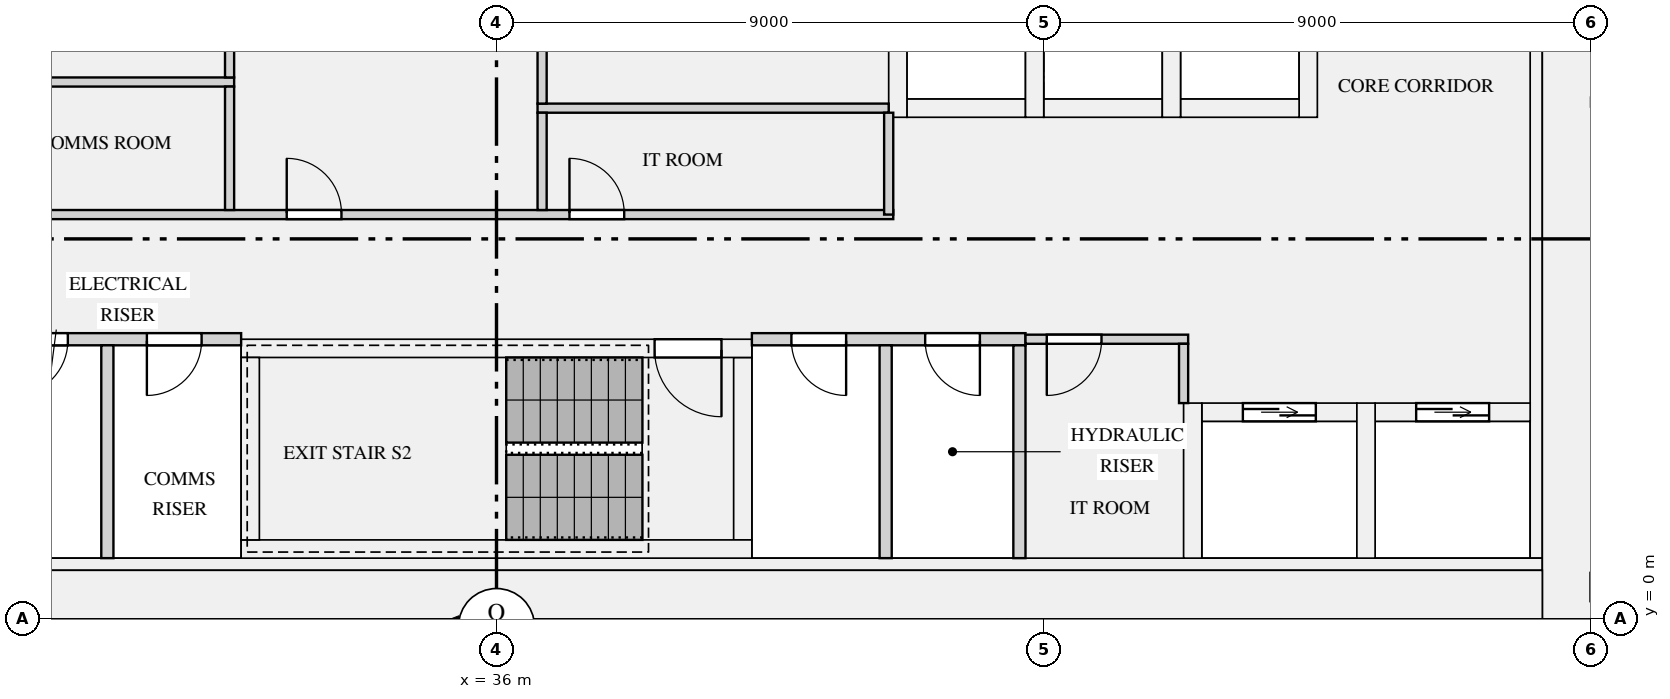
"""IFC4 building model, lengths in metres.
Left out: names, types, materials, properties, quantities, classifications, styles, units other than length and angle.
Written with IfcOpenShell. Run it as: python <this file> out.ifc"""

import sys

from ifc_helpers import new_model, si_unit, direction, frame, frame_2d, origin, place, context, subcontext, project, spatial, rectangle, extrude, element, fill, save


model = new_model("IFC4")
c1 = context("Model", 3, precision=1e-05, world=origin(), true_north=direction((0.0, 1.0)))
c2 = subcontext(c1, "Body", "Model", "MODEL_VIEW")
j1 = project(units=[si_unit("LENGTHUNIT", "METRE"), si_unit("PLANEANGLEUNIT", "RADIAN")], contexts=[c1])
p1 = place(None, origin())
s1 = spatial("IfcSite", under=j1, at=p1, CompositionType="ELEMENT")
p2 = place(p1, origin())
s2 = spatial("IfcBuilding", under=s1, at=p2, CompositionType="ELEMENT")
p3 = place(p2, frame((0.0, 0.0, 93.0)))
s3 = spatial("IfcBuildingStorey", under=s2, at=p3, CompositionType="ELEMENT", Elevation=93.0)
p4 = place(p3, frame((53.6, 0.0, 0.0), z_axis=(0.0, 0.0, 1.0), x_axis=(0.0, 1.0, 0.0)))
e1 = element("IfcWall", 1, at=p4, inside=s3, PredefinedType="SHEAR", context=c2, shape_type="SweptSolid", body=[
    extrude(rectangle(XDim=12.5, YDim=0.8, at=frame_2d((6.25, 0.0))), origin(), (0.0, 0.0, 1.0), 3.15),
])
p5 = place(p3, frame((18.8, 0.4, 0.0), z_axis=(0.0, 0.0, 1.0), x_axis=(1.0, 0.0, 0.0)))
e2 = element("IfcWall", 2, at=p5, inside=s3, PredefinedType="SHEAR", context=c2, shape_type="SweptSolid", body=[
    extrude(rectangle(XDim=34.4, YDim=0.8, at=frame_2d((17.2, 0.0))), origin(), (0.0, 0.0, 1.0), 3.15),
])
p6 = place(p3, frame((53.1, 1.0, 0.0), z_axis=(0.0, 0.0, 1.0), x_axis=(0.0, 1.0, 0.0)))
e3 = element("IfcWall", 3, at=p6, inside=s3, PredefinedType="SHEAR", context=c2, shape_type="SweptSolid", body=[
    extrude(rectangle(XDim=10.9, YDim=0.2, at=frame_2d((5.45, 0.0))), origin(), (0.0, 0.0, 1.0), 3.15),
])
p7 = place(p3, frame((18.8, 0.9, 0.0), z_axis=(0.0, 0.0, 1.0), x_axis=(1.0, 0.0, 0.0)))
e4 = element("IfcWall", 4, at=p7, inside=s3, PredefinedType="SHEAR", context=c2, shape_type="SweptSolid", body=[
    extrude(rectangle(XDim=34.4, YDim=0.2, at=frame_2d((17.2, 0.0))), origin(), (0.0, 0.0, 1.0), 3.15),
])
p8 = place(p3, frame((42.75, 8.4, 0.0), z_axis=(0.0, 0.0, 1.0), x_axis=(1.0, 0.0, 0.0)))
e5 = element("IfcWall", 5, at=p8, inside=s3, PredefinedType="SHEAR", context=c2, shape_type="SweptSolid", body=[
    extrude(rectangle(XDim=1.95, YDim=0.3, at=frame_2d((0.975, 0.0))), origin(), (0.0, 0.0, 1.0), 3.15),
])
p9 = place(p3, frame((42.6, 8.25, 0.0), z_axis=(0.0, 0.0, 1.0), x_axis=(0.0, 1.0, 0.0)))
e6 = element("IfcWall", 6, at=p9, inside=s3, PredefinedType="SHEAR", context=c2, shape_type="SweptSolid", body=[
    extrude(rectangle(XDim=3.65, YDim=0.3, at=frame_2d((1.825, 0.0))), origin(), (0.0, 0.0, 1.0), 3.15),
])
p10 = place(p3, frame((45.0, 8.4, 0.0), z_axis=(0.0, 0.0, 1.0), x_axis=(1.0, 0.0, 0.0)))
e7 = element("IfcWall", 7, at=p10, inside=s3, PredefinedType="SHEAR", context=c2, shape_type="SweptSolid", body=[
    extrude(rectangle(XDim=1.95, YDim=0.3, at=frame_2d((0.975, 0.0))), origin(), (0.0, 0.0, 1.0), 3.15),
])
p11 = place(p3, frame((44.85, 8.25, 0.0), z_axis=(0.0, 0.0, 1.0), x_axis=(0.0, 1.0, 0.0)))
e8 = element("IfcWall", 8, at=p11, inside=s3, PredefinedType="SHEAR", context=c2, shape_type="SweptSolid", body=[
    extrude(rectangle(XDim=3.65, YDim=0.3, at=frame_2d((1.825, 0.0))), origin(), (0.0, 0.0, 1.0), 3.15),
])
p12 = place(p3, frame((47.25, 8.4, 0.0), z_axis=(0.0, 0.0, 1.0), x_axis=(1.0, 0.0, 0.0)))
e9 = element("IfcWall", 9, at=p12, inside=s3, PredefinedType="SHEAR", context=c2, shape_type="SweptSolid", body=[
    extrude(rectangle(XDim=1.95, YDim=0.3, at=frame_2d((0.975, 0.0))), origin(), (0.0, 0.0, 1.0), 3.15),
])
for number, where, z_axis, x_axis in (
    (10, (47.1, 8.25, 0.0), (0.0, 0.0, 1.0), (0.0, 1.0, 0.0)),
    (11, (49.35, 8.25, 0.0), (0.0, 0.0, 1.0), (0.0, 1.0, 0.0)),
):
    element("IfcWall", number, at=place(p3, frame(where, z_axis=z_axis, x_axis=x_axis)), inside=s3, PredefinedType="SHEAR", context=c2, shape_type="SweptSolid", body=[
        extrude(rectangle(XDim=3.65, YDim=0.3, at=frame_2d((1.825, 0.0))), origin(), (0.0, 0.0, 1.0), 3.15),
    ])
p13 = place(p3, frame((47.6, 3.4, 0.0), z_axis=(0.0, 0.0, 1.0), x_axis=(1.0, 0.0, 0.0)))
e12 = element("IfcWall", 12, at=p13, inside=s3, PredefinedType="SHEAR", context=c2, shape_type="SweptSolid", body=[
    extrude(rectangle(XDim=2.55, YDim=0.3, at=frame_2d((1.275, 0.0))), origin(), (0.0, 0.0, 1.0), 3.15),
])
p14 = place(p13, frame((0.675, 0.0, 0.0)))
e13 = element("IfcOpeningElement", 13, at=p14, cuts=e12, PredefinedType="OPENING", context=c2, shape_type="SweptSolid", body=[
    extrude(rectangle(XDim=1.2, YDim=2.1, at=frame_2d((0.6, 1.05))), frame((0.0, 0.16, 0.0), z_axis=(0.0, -1.0, 0.0), x_axis=(1.0, 0.0, 0.0)), (0.0, 0.0, 1.0), 0.32),
])
p15 = place(p3, frame((47.45, 1.0, 0.0), z_axis=(0.0, 0.0, 1.0), x_axis=(0.0, 1.0, 0.0)))
e14 = element("IfcWall", 14, at=p15, inside=s3, PredefinedType="SHEAR", context=c2, shape_type="SweptSolid", body=[
    extrude(rectangle(XDim=2.55, YDim=0.3, at=frame_2d((1.275, 0.0))), origin(), (0.0, 0.0, 1.0), 3.15),
])
p16 = place(p3, frame((50.45, 3.4, 0.0), z_axis=(0.0, 0.0, 1.0), x_axis=(1.0, 0.0, 0.0)))
e15 = element("IfcWall", 15, at=p16, inside=s3, PredefinedType="SHEAR", context=c2, shape_type="SweptSolid", body=[
    extrude(rectangle(XDim=2.55, YDim=0.3, at=frame_2d((1.275, 0.0))), origin(), (0.0, 0.0, 1.0), 3.15),
])
p17 = place(p16, frame((0.675, 0.0, 0.0)))
e16 = element("IfcOpeningElement", 16, at=p17, cuts=e15, PredefinedType="OPENING", context=c2, shape_type="SweptSolid", body=[
    extrude(rectangle(XDim=1.2, YDim=2.1, at=frame_2d((0.6, 1.05))), frame((0.0, 0.16, 0.0), z_axis=(0.0, -1.0, 0.0), x_axis=(1.0, 0.0, 0.0)), (0.0, 0.0, 1.0), 0.32),
])
p18 = place(p3, frame((50.3, 1.0, 0.0), z_axis=(0.0, 0.0, 1.0), x_axis=(0.0, 1.0, 0.0)))
e17 = element("IfcWall", 17, at=p18, inside=s3, PredefinedType="SHEAR", context=c2, shape_type="SweptSolid", body=[
    extrude(rectangle(XDim=2.55, YDim=0.3, at=frame_2d((1.275, 0.0))), origin(), (0.0, 0.0, 1.0), 3.15),
])
p19 = place(p3, frame((31.8, 1.15, 0.0), z_axis=(0.0, 0.0, 1.0), x_axis=(1.0, 0.0, 0.0)))
e18 = element("IfcWall", 18, at=p19, inside=s3, PredefinedType="SHEAR", context=c2, shape_type="SweptSolid", body=[
    extrude(rectangle(XDim=8.4, YDim=0.3, at=frame_2d((4.2, 0.0))), origin(), (0.0, 0.0, 1.0), 3.15),
])
p20 = place(p3, frame((31.8, 4.45, 0.0), z_axis=(0.0, 0.0, 1.0), x_axis=(1.0, 0.0, 0.0)))
e19 = element("IfcWall", 19, at=p20, inside=s3, PredefinedType="SHEAR", context=c2, shape_type="SweptSolid", body=[
    extrude(rectangle(XDim=8.4, YDim=0.3, at=frame_2d((4.2, 0.0))), origin(), (0.0, 0.0, 1.0), 3.15),
])
p21 = place(p20, frame((6.8, 0.0, 0.0)))
e20 = element("IfcOpeningElement", 20, at=p21, cuts=e19, PredefinedType="OPENING", context=c2, shape_type="SweptSolid", body=[
    extrude(rectangle(XDim=1.1, YDim=2.1, at=frame_2d((0.55, 1.05))), frame((0.0, 0.16, 0.0), z_axis=(0.0, -1.0, 0.0), x_axis=(1.0, 0.0, 0.0)), (0.0, 0.0, 1.0), 0.32),
])
for number, where, z_axis, x_axis in (
    (21, (31.95, 1.3, 0.0), (0.0, 0.0, 1.0), (0.0, 1.0, 0.0)),
    (22, (40.05, 1.3, 0.0), (0.0, 0.0, 1.0), (0.0, 1.0, 0.0)),
):
    element("IfcWall", number, at=place(p3, frame(where, z_axis=z_axis, x_axis=x_axis)), inside=s3, PredefinedType="SHEAR", context=c2, shape_type="SweptSolid", body=[
        extrude(rectangle(XDim=3.0, YDim=0.3, at=frame_2d((1.5, 0.0))), origin(), (0.0, 0.0, 1.0), 3.15),
    ])
p22 = place(p3, frame((27.3, 4.6, 0.0), z_axis=(0.0, 0.0, 1.0), x_axis=(1.0, 0.0, 0.0)))
e23 = element("IfcWall", 23, at=p22, inside=s3, PredefinedType="PARTITIONING", context=c2, shape_type="SweptSolid", body=[
    extrude(rectangle(XDim=4.5, YDim=0.2, at=frame_2d((2.25, 0.0))), origin(), (0.0, 0.0, 1.0), 2.83),
])
p23 = place(p22, frame((0.75, 0.0, 0.0)))
e24 = element("IfcOpeningElement", 24, at=p23, cuts=e23, PredefinedType="OPENING", context=c2, shape_type="SweptSolid", body=[
    extrude(rectangle(XDim=0.9, YDim=2.1, at=frame_2d((0.45, 1.05))), frame((0.0, 0.11, 0.0), z_axis=(0.0, -1.0, 0.0), x_axis=(1.0, 0.0, 0.0)), (0.0, 0.0, 1.0), 0.22),
])
p24 = place(p22, frame((2.95, 0.0, 0.0)))
e25 = element("IfcOpeningElement", 25, at=p24, cuts=e23, PredefinedType="OPENING", context=c2, shape_type="SweptSolid", body=[
    extrude(rectangle(XDim=0.9, YDim=2.1, at=frame_2d((0.45, 1.05))), frame((0.0, 0.11, 0.0), z_axis=(0.0, -1.0, 0.0), x_axis=(1.0, 0.0, 0.0)), (0.0, 0.0, 1.0), 0.22),
])
p25 = place(p3, frame((40.2, 4.6, 0.0), z_axis=(0.0, 0.0, 1.0), x_axis=(1.0, 0.0, 0.0)))
e26 = element("IfcWall", 26, at=p25, inside=s3, PredefinedType="PARTITIONING", context=c2, shape_type="SweptSolid", body=[
    extrude(rectangle(XDim=4.5, YDim=0.2, at=frame_2d((2.25, 0.0))), origin(), (0.0, 0.0, 1.0), 2.83),
])
p26 = place(p25, frame((0.65, 0.0, 0.0)))
e27 = element("IfcOpeningElement", 27, at=p26, cuts=e26, PredefinedType="OPENING", context=c2, shape_type="SweptSolid", body=[
    extrude(rectangle(XDim=0.9, YDim=2.1, at=frame_2d((0.45, 1.05))), frame((0.0, 0.11, 0.0), z_axis=(0.0, -1.0, 0.0), x_axis=(1.0, 0.0, 0.0)), (0.0, 0.0, 1.0), 0.22),
])
p27 = place(p25, frame((2.85, 0.0, 0.0)))
e28 = element("IfcOpeningElement", 28, at=p27, cuts=e26, PredefinedType="OPENING", context=c2, shape_type="SweptSolid", body=[
    extrude(rectangle(XDim=0.9, YDim=2.1, at=frame_2d((0.45, 1.05))), frame((0.0, 0.11, 0.0), z_axis=(0.0, -1.0, 0.0), x_axis=(1.0, 0.0, 0.0)), (0.0, 0.0, 1.0), 0.22),
])
p28 = place(p3, frame((44.7, 4.6, 0.0), z_axis=(0.0, 0.0, 1.0), x_axis=(1.0, 0.0, 0.0)))
e29 = element("IfcWall", 29, at=p28, inside=s3, PredefinedType="PARTITIONING", context=c2, shape_type="SweptSolid", body=[
    extrude(rectangle(XDim=2.675, YDim=0.15, at=frame_2d((1.337, 0.0))), origin(), (0.0, 0.0, 1.0), 2.83),
])
p29 = place(p28, frame((0.35, 0.0, 0.0)))
e30 = element("IfcOpeningElement", 30, at=p29, cuts=e29, PredefinedType="OPENING", context=c2, shape_type="SweptSolid", body=[
    extrude(rectangle(XDim=0.9, YDim=2.1, at=frame_2d((0.45, 1.05))), frame((0.0, 0.085, 0.0), z_axis=(0.0, -1.0, 0.0), x_axis=(1.0, 0.0, 0.0)), (0.0, 0.0, 1.0), 0.17),
])
p30 = place(p3, frame((22.725, 6.65, 0.0), z_axis=(0.0, 0.0, 1.0), x_axis=(1.0, 0.0, 0.0)))
e31 = element("IfcWall", 31, at=p30, inside=s3, PredefinedType="PARTITIONING", context=c2, shape_type="SweptSolid", body=[
    extrude(rectangle(XDim=19.8, YDim=0.15, at=frame_2d((9.9, 0.0))), origin(), (0.0, 0.0, 1.0), 2.83),
])
p31 = place(p30, frame((0.825, 0.0, 0.0)))
e32 = element("IfcOpeningElement", 32, at=p31, cuts=e31, PredefinedType="OPENING", context=c2, shape_type="SweptSolid", body=[
    extrude(rectangle(XDim=0.9, YDim=2.1, at=frame_2d((0.45, 1.05))), frame((0.0, 0.085, 0.0), z_axis=(0.0, -1.0, 0.0), x_axis=(1.0, 0.0, 0.0)), (0.0, 0.0, 1.0), 0.17),
])
p32 = place(p30, frame((4.825, 0.0, 0.0)))
e33 = element("IfcOpeningElement", 33, at=p32, cuts=e31, PredefinedType="OPENING", context=c2, shape_type="SweptSolid", body=[
    extrude(rectangle(XDim=0.9, YDim=2.1, at=frame_2d((0.45, 1.05))), frame((0.0, 0.085, 0.0), z_axis=(0.0, -1.0, 0.0), x_axis=(1.0, 0.0, 0.0)), (0.0, 0.0, 1.0), 0.17),
])
p33 = place(p30, frame((9.825, 0.0, 0.0)))
e34 = element("IfcOpeningElement", 34, at=p33, cuts=e31, PredefinedType="OPENING", context=c2, shape_type="SweptSolid", body=[
    extrude(rectangle(XDim=0.9, YDim=2.1, at=frame_2d((0.45, 1.05))), frame((0.0, 0.085, 0.0), z_axis=(0.0, -1.0, 0.0), x_axis=(1.0, 0.0, 0.0)), (0.0, 0.0, 1.0), 0.17),
])
p34 = place(p30, frame((14.475, 0.0, 0.0)))
e35 = element("IfcOpeningElement", 35, at=p34, cuts=e31, PredefinedType="OPENING", context=c2, shape_type="SweptSolid", body=[
    extrude(rectangle(XDim=0.9, YDim=2.1, at=frame_2d((0.45, 1.05))), frame((0.0, 0.085, 0.0), z_axis=(0.0, -1.0, 0.0), x_axis=(1.0, 0.0, 0.0)), (0.0, 0.0, 1.0), 0.17),
])
p35 = place(p3, frame((36.675, 8.4, 0.0), z_axis=(0.0, 0.0, 1.0), x_axis=(1.0, 0.0, 0.0)))
e36 = element("IfcWall", 36, at=p35, inside=s3, PredefinedType="PARTITIONING", context=c2, shape_type="SweptSolid", body=[
    extrude(rectangle(XDim=5.775, YDim=0.15, at=frame_2d((2.887, 0.0))), origin(), (0.0, 0.0, 1.0), 2.83),
])
p36 = place(p3, frame((22.725, 8.83, 0.0), z_axis=(0.0, 0.0, 1.0), x_axis=(1.0, 0.0, 0.0)))
e37 = element("IfcWall", 37, at=p36, inside=s3, PredefinedType="PARTITIONING", context=c2, shape_type="SweptSolid", body=[
    extrude(rectangle(XDim=8.96, YDim=0.15, at=frame_2d((4.48, 0.0))), origin(), (0.0, 0.0, 1.0), 2.83),
])
for number, where, z_axis, x_axis in (
    (38, (29.6, 1.0, 0.0), (0.0, 0.0, 1.0), (0.0, 1.0, 0.0)),
    (39, (42.4, 1.0, 0.0), (0.0, 0.0, 1.0), (0.0, 1.0, 0.0)),
    (40, (44.6, 1.0, 0.0), (0.0, 0.0, 1.0), (0.0, 1.0, 0.0)),
):
    element("IfcWall", number, at=place(p3, frame(where, z_axis=z_axis, x_axis=x_axis)), inside=s3, PredefinedType="PARTITIONING", context=c2, shape_type="SweptSolid", body=[
        extrude(rectangle(XDim=3.5, YDim=0.2, at=frame_2d((1.75, 0.0))), origin(), (0.0, 0.0, 1.0), 2.83),
    ])
p37 = place(p3, frame((47.3, 3.55, 0.0), z_axis=(0.0, 0.0, 1.0), x_axis=(0.0, 1.0, 0.0)))
e41 = element("IfcWall", 41, at=p37, inside=s3, PredefinedType="PARTITIONING", context=c2, shape_type="SweptSolid", body=[
    extrude(rectangle(XDim=0.975, YDim=0.15, at=frame_2d((0.487, 0.0))), origin(), (0.0, 0.0, 1.0), 2.83),
])
p38 = place(p3, frame((42.45, 6.65, 0.0), z_axis=(0.0, 0.0, 1.0), x_axis=(0.0, 1.0, 0.0)))
e42 = element("IfcWall", 42, at=p38, inside=s3, PredefinedType="PARTITIONING", context=c2, shape_type="SweptSolid", body=[
    extrude(rectangle(XDim=1.675, YDim=0.15, at=frame_2d((0.837, 0.0))), origin(), (0.0, 0.0, 1.0), 2.83),
])
p39 = place(p3, frame((31.61, 6.725, 0.0), z_axis=(0.0, 0.0, 1.0), x_axis=(0.0, 1.0, 0.0)))
e43 = element("IfcWall", 43, at=p39, inside=s3, PredefinedType="PARTITIONING", context=c2, shape_type="SweptSolid", body=[
    extrude(rectangle(XDim=2.03, YDim=0.15, at=frame_2d((1.015, 0.0))), origin(), (0.0, 0.0, 1.0), 2.83),
])
p40 = place(p3, frame((36.75, 6.725, 0.0), z_axis=(0.0, 0.0, 1.0), x_axis=(0.0, 1.0, 0.0)))
e44 = element("IfcWall", 44, at=p40, inside=s3, PredefinedType="PARTITIONING", context=c2, shape_type="SweptSolid", body=[
    extrude(rectangle(XDim=1.6, YDim=0.15, at=frame_2d((0.8, 0.0))), origin(), (0.0, 0.0, 1.0), 2.83),
])
p41 = place(p3, frame((36.75, 8.475, 0.0), z_axis=(0.0, 0.0, 1.0), x_axis=(0.0, 1.0, 0.0)))
e45 = element("IfcWall", 45, at=p41, inside=s3, PredefinedType="PARTITIONING", context=c2, shape_type="SweptSolid", body=[
    extrude(rectangle(XDim=3.425, YDim=0.15, at=frame_2d((1.712, 0.0))), origin(), (0.0, 0.0, 1.0), 2.83),
])
p42 = place(p3, frame((31.61, 8.905, 0.0), z_axis=(0.0, 0.0, 1.0), x_axis=(0.0, 1.0, 0.0)))
e46 = element("IfcWall", 46, at=p42, inside=s3, PredefinedType="PARTITIONING", context=c2, shape_type="SweptSolid", body=[
    extrude(rectangle(XDim=2.995, YDim=0.15, at=frame_2d((1.498, 0.0))), origin(), (0.0, 0.0, 1.0), 2.83),
])
p43 = place(p3, frame((54.0, 8.5, 0.0), z_axis=(0.0, 0.0, 1.0), x_axis=(1.0, 0.0, 0.0)))
e47 = element("IfcWall", 47, at=p43, inside=s3, PredefinedType="PARTITIONING", context=c2, shape_type="SweptSolid", body=[
    extrude(rectangle(XDim=8.925, YDim=0.15, at=frame_2d((4.462, 0.0))), origin(), (0.0, 0.0, 1.0), 2.83),
])
p44 = place(p43, frame((1.8, 0.0, 0.0)))
e48 = element("IfcOpeningElement", 48, at=p44, cuts=e47, PredefinedType="OPENING", context=c2, shape_type="SweptSolid", body=[
    extrude(rectangle(XDim=0.9, YDim=2.1, at=frame_2d((0.45, 1.05))), frame((0.0, 0.085, 0.0), z_axis=(0.0, -1.0, 0.0), x_axis=(1.0, 0.0, 0.0)), (0.0, 0.0, 1.0), 0.17),
])
p45 = place(p43, frame((6.3, 0.0, 0.0)))
e49 = element("IfcOpeningElement", 49, at=p45, cuts=e47, PredefinedType="OPENING", context=c2, shape_type="SweptSolid", body=[
    extrude(rectangle(XDim=0.9, YDim=2.1, at=frame_2d((0.45, 1.05))), frame((0.0, 0.085, 0.0), z_axis=(0.0, -1.0, 0.0), x_axis=(1.0, 0.0, 0.0)), (0.0, 0.0, 1.0), 0.17),
])
p46 = place(p14, origin())
e50 = element("IfcDoor", 50, at=p46, inside=s3, OperationType="DOUBLE_DOOR_SLIDING", PredefinedType="DOOR", context=c2, shape_type="SweptSolid", body=[
    extrude(rectangle(XDim=1.2, YDim=2.1, at=frame_2d((0.6, 1.05))), frame((0.0, 0.025, 0.0), z_axis=(0.0, -1.0, 0.0), x_axis=(1.0, 0.0, 0.0)), (0.0, 0.0, 1.0), 0.05),
])
fill(e13, e50)
p47 = place(p17, origin())
e51 = element("IfcDoor", 51, at=p47, inside=s3, OperationType="DOUBLE_DOOR_SLIDING", PredefinedType="DOOR", context=c2, shape_type="SweptSolid", body=[
    extrude(rectangle(XDim=1.2, YDim=2.1, at=frame_2d((0.6, 1.05))), frame((0.0, 0.025, 0.0), z_axis=(0.0, -1.0, 0.0), x_axis=(1.0, 0.0, 0.0)), (0.0, 0.0, 1.0), 0.05),
])
fill(e16, e51)
p48 = place(p21, frame((1.1, 0.0, 0.0), z_axis=(0.0, 0.0, 1.0), x_axis=(-1.0, 0.0, 0.0)))
e52 = element("IfcDoor", 52, at=p48, inside=s3, OperationType="SINGLE_SWING_LEFT", PredefinedType="DOOR", context=c2, shape_type="SweptSolid", body=[
    extrude(rectangle(XDim=1.1, YDim=2.1, at=frame_2d((0.55, 1.05))), frame((0.0, 0.025, 0.0), z_axis=(0.0, -1.0, 0.0), x_axis=(1.0, 0.0, 0.0)), (0.0, 0.0, 1.0), 0.05),
])
fill(e20, e52)
p49 = place(p29, frame((0.9, 0.0, 0.0), z_axis=(0.0, 0.0, 1.0), x_axis=(-1.0, 0.0, 0.0)))
e53 = element("IfcDoor", 53, at=p49, inside=s3, OperationType="SINGLE_SWING_RIGHT", PredefinedType="DOOR", context=c2, shape_type="SweptSolid", body=[
    extrude(rectangle(XDim=0.9, YDim=2.1, at=frame_2d((0.45, 1.05))), frame((0.0, 0.025, 0.0), z_axis=(0.0, -1.0, 0.0), x_axis=(1.0, 0.0, 0.0)), (0.0, 0.0, 1.0), 0.05),
])
fill(e30, e53)
p50 = place(p33, origin())
e54 = element("IfcDoor", 54, at=p50, inside=s3, OperationType="SINGLE_SWING_LEFT", PredefinedType="DOOR", context=c2, shape_type="SweptSolid", body=[
    extrude(rectangle(XDim=0.9, YDim=2.1, at=frame_2d((0.45, 1.05))), frame((0.0, 0.025, 0.0), z_axis=(0.0, -1.0, 0.0), x_axis=(1.0, 0.0, 0.0)), (0.0, 0.0, 1.0), 0.05),
])
fill(e34, e54)
p51 = place(p34, origin())
e55 = element("IfcDoor", 55, at=p51, inside=s3, OperationType="SINGLE_SWING_LEFT", PredefinedType="DOOR", context=c2, shape_type="SweptSolid", body=[
    extrude(rectangle(XDim=0.9, YDim=2.1, at=frame_2d((0.45, 1.05))), frame((0.0, 0.025, 0.0), z_axis=(0.0, -1.0, 0.0), x_axis=(1.0, 0.0, 0.0)), (0.0, 0.0, 1.0), 0.05),
])
fill(e35, e55)
p52 = place(p23, frame((0.9, 0.0, 0.0), z_axis=(0.0, 0.0, 1.0), x_axis=(-1.0, 0.0, 0.0)))
e56 = element("IfcDoor", 56, at=p52, inside=s3, OperationType="SINGLE_SWING_RIGHT", PredefinedType="DOOR", context=c2, shape_type="SweptSolid", body=[
    extrude(rectangle(XDim=0.9, YDim=2.1, at=frame_2d((0.45, 1.05))), frame((0.0, 0.025, 0.0), z_axis=(0.0, -1.0, 0.0), x_axis=(1.0, 0.0, 0.0)), (0.0, 0.0, 1.0), 0.05),
])
fill(e24, e56)
p53 = place(p24, frame((0.9, 0.0, 0.0), z_axis=(0.0, 0.0, 1.0), x_axis=(-1.0, 0.0, 0.0)))
e57 = element("IfcDoor", 57, at=p53, inside=s3, OperationType="SINGLE_SWING_RIGHT", PredefinedType="DOOR", context=c2, shape_type="SweptSolid", body=[
    extrude(rectangle(XDim=0.9, YDim=2.1, at=frame_2d((0.45, 1.05))), frame((0.0, 0.025, 0.0), z_axis=(0.0, -1.0, 0.0), x_axis=(1.0, 0.0, 0.0)), (0.0, 0.0, 1.0), 0.05),
])
fill(e25, e57)
p54 = place(p26, frame((0.9, 0.0, 0.0), z_axis=(0.0, 0.0, 1.0), x_axis=(-1.0, 0.0, 0.0)))
e58 = element("IfcDoor", 58, at=p54, inside=s3, OperationType="SINGLE_SWING_LEFT", PredefinedType="DOOR", context=c2, shape_type="SweptSolid", body=[
    extrude(rectangle(XDim=0.9, YDim=2.1, at=frame_2d((0.45, 1.05))), frame((0.0, 0.025, 0.0), z_axis=(0.0, -1.0, 0.0), x_axis=(1.0, 0.0, 0.0)), (0.0, 0.0, 1.0), 0.05),
])
fill(e27, e58)
p55 = place(p27, frame((0.9, 0.0, 0.0), z_axis=(0.0, 0.0, 1.0), x_axis=(-1.0, 0.0, 0.0)))
e59 = element("IfcDoor", 59, at=p55, inside=s3, OperationType="SINGLE_SWING_LEFT", PredefinedType="DOOR", context=c2, shape_type="SweptSolid", body=[
    extrude(rectangle(XDim=0.9, YDim=2.1, at=frame_2d((0.45, 1.05))), frame((0.0, 0.025, 0.0), z_axis=(0.0, -1.0, 0.0), x_axis=(1.0, 0.0, 0.0)), (0.0, 0.0, 1.0), 0.05),
])
fill(e28, e59)
save(model, sys.argv[1])
